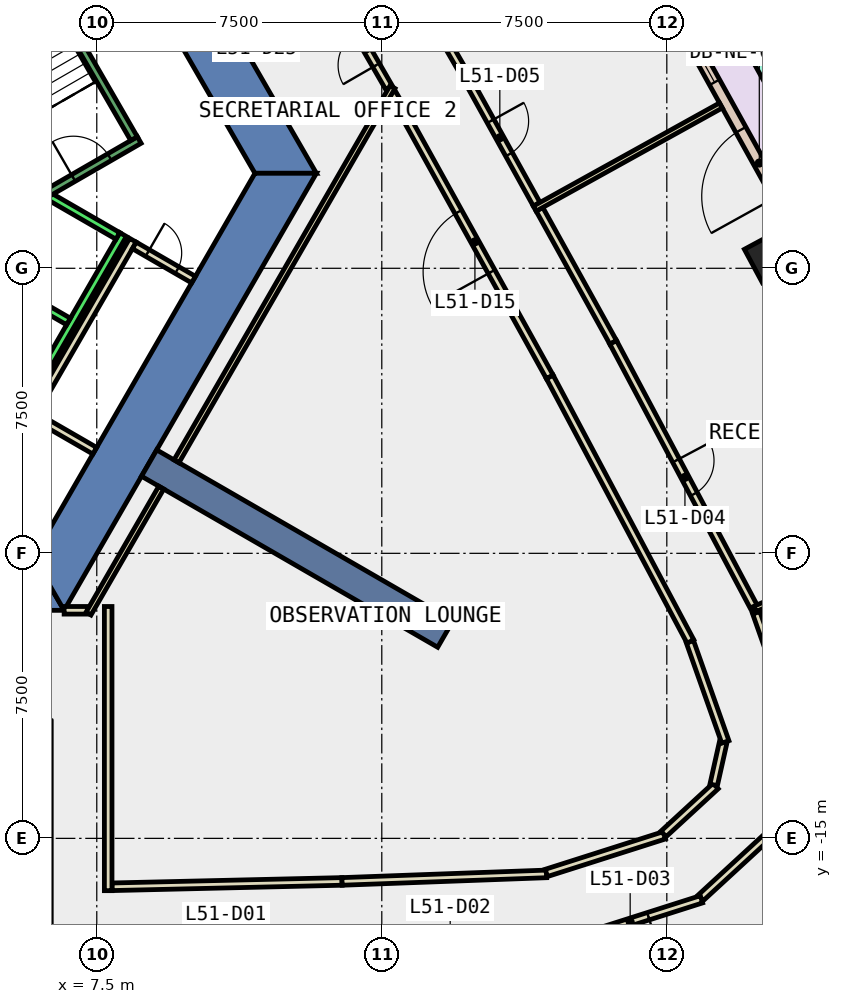
"""IFC4 building model, lengths in metres.
Left out: names, types, materials, properties, quantities, classifications, styles, units other than length and angle.
Written with IfcOpenShell. Run it as: python <this file> out.ifc"""

import sys

from ifc_helpers import new_model, si_unit, direction, frame, frame_2d, origin, origin_2d, place, context, subcontext, project, spatial, polyline, rectangle, outline, extrude, element, fill, save


model = new_model("IFC4")
c1 = context("Model", 3, precision=1e-05, world=origin(), true_north=direction((0.0, 1.0)))
c2 = subcontext(c1, "Body", "Model", "MODEL_VIEW")
j1 = project(units=[si_unit("LENGTHUNIT", "METRE"), si_unit("PLANEANGLEUNIT", "RADIAN")], contexts=[c1])
p1 = place(None, origin())
s1 = spatial("IfcSite", under=j1, at=p1, CompositionType="ELEMENT")
p2 = place(p1, origin())
s2 = spatial("IfcBuilding", under=s1, at=p2, CompositionType="ELEMENT")
p3 = place(p2, frame((0.0, 0.0, 227.6)))
s3 = spatial("IfcBuildingStorey", under=s2, at=p3, CompositionType="ELEMENT", Elevation=227.6)
p4 = place(p3, frame((25.395, 0.391, -0.4), z_axis=(0.0, 0.0, 1.0), x_axis=(-0.474134310084, 0.880452529102, 0.0)))
e1 = element("IfcColumn", 1, at=p4, inside=s3, PredefinedType="COLUMN", context=c2, shape_type="SweptSolid", body=[
    extrude(rectangle(XDim=1.0, YDim=1.4, at=origin_2d()), origin(), (0.0, 0.0, 1.0), 4.2),
])
p5 = place(p3, frame((0.0, 0.0, -0.4)))
e2 = element("IfcWall", 2, at=p5, inside=s3, PredefinedType="SHEAR", context=c2, shape_type="SweptSolid", body=[
    extrude(outline(polyline([(8.084, 11.498), (6.871, 10.798), (11.662, 2.5), (13.279, 2.5), (8.084, 11.498)])), origin(), (0.0, 0.0, 1.0), 4.2),
])
p6 = place(p3, frame((0.0, 0.0, -0.4)))
e3 = element("IfcWall", 3, at=p6, inside=s3, PredefinedType="SHEAR", context=c2, shape_type="SweptSolid", body=[
    extrude(outline(polyline([(5.75, -7.6), (5.75, -9.0), (6.64, -9.0), (5.831, -7.6), (5.75, -7.6)])), origin(), (0.0, 0.0, 1.0), 4.2),
])
p7 = place(p3, frame((0.0, 0.0, -0.4)))
e4 = element("IfcWall", 4, at=p7, inside=s3, PredefinedType="SHEAR", context=c2, shape_type="SweptSolid", body=[
    extrude(outline(polyline([(6.64, -9.0), (13.279, 2.5), (11.662, 2.5), (5.831, -7.6), (6.64, -9.0)])), origin(), (0.0, 0.0, 1.0), 4.2),
])
p8 = place(p3, frame((8.877, -5.125, -0.4), z_axis=(0.0, 0.0, 1.0), x_axis=(0.866017533419, -0.500013631625, 0.0)))
e5 = element("IfcWall", 5, at=p8, inside=s3, PredefinedType="SHEAR", context=c2, shape_type="SweptSolid", body=[
    extrude(rectangle(XDim=9.0, YDim=0.8, at=frame_2d((4.5, 0.0))), origin(), (0.0, 0.0, 1.0), 4.2),
])
p9 = place(p3, frame((25.813, 1.183, 0.0), z_axis=(0.0, 0.0, 1.0), x_axis=(-0.484742980126, 0.874656643043, 0.0)))
e6 = element("IfcWall", 6, at=p9, inside=s3, PredefinedType="STANDARD", context=c2, shape_type="SweptSolid", body=[
    extrude(rectangle(XDim=7.258, YDim=0.3, at=frame_2d((3.629, 0.0))), origin(), (0.0, 0.0, 1.0), 3.8),
])
p10 = place(p9, frame((0.814, 0.0, 0.0)))
e7 = element("IfcOpeningElement", 7, at=p10, cuts=e6, PredefinedType="OPENING", context=c2, shape_type="SweptSolid", body=[
    extrude(rectangle(XDim=2.0, YDim=2.4, at=frame_2d((1.0, 1.2))), frame((0.0, 0.16, 0.0), z_axis=(0.0, -1.0, 0.0), x_axis=(1.0, 0.0, 0.0)), (0.0, 0.0, 1.0), 0.32),
])
p11 = place(p9, frame((4.243, 0.0, 0.9)))
e8 = element("IfcOpeningElement", 8, at=p11, cuts=e6, PredefinedType="OPENING", context=c2, shape_type="SweptSolid", body=[
    extrude(rectangle(XDim=2.4, YDim=2.6, at=frame_2d((1.2, 1.3))), frame((0.0, 0.16, 0.0), z_axis=(0.0, -1.0, 0.0), x_axis=(1.0, 0.0, 0.0)), (0.0, 0.0, 1.0), 0.32),
])
p12 = place(p3, frame((27.121, 2.021, 0.0), z_axis=(0.0, 0.0, 1.0), x_axis=(-0.484785237665, 0.874633222181, 0.0)))
e9 = element("IfcWall", 9, at=p12, inside=s3, PredefinedType="STANDARD", context=c2, shape_type="SweptSolid", body=[
    extrude(rectangle(XDim=7.059, YDim=0.8, at=frame_2d((3.53, 0.0))), origin(), (0.0, 0.0, 1.0), 0.8),
])
p13 = place(p3, frame((15.194, 4.747, 0.0), z_axis=(0.0, 0.0, 1.0), x_axis=(-0.500140598757, 0.865944213836, 0.0)))
e10 = element("IfcWall", 10, at=p13, inside=s3, PredefinedType="PARTITIONING", context=c2, shape_type="SweptSolid", body=[
    extrude(rectangle(XDim=2.375, YDim=0.2, at=frame_2d((1.188, 0.0))), origin(), (0.0, 0.0, 1.0), 3.8),
])
p14 = place(p13, frame((0.688, 0.0, 0.0)))
e11 = element("IfcOpeningElement", 11, at=p14, cuts=e10, PredefinedType="OPENING", context=c2, shape_type="SweptSolid", body=[
    extrude(rectangle(XDim=1.0, YDim=2.1, at=frame_2d((0.5, 1.05))), frame((0.0, 0.11, 0.0), z_axis=(0.0, -1.0, 0.0), x_axis=(1.0, 0.0, 0.0)), (0.0, 0.0, 1.0), 0.22),
])
p15 = place(p3, frame((7.9, -16.274, 0.0), z_axis=(0.0, 0.0, 1.0), x_axis=(0.999729409829, 0.023261709391, 0.0)))
e12 = element("IfcWall", 12, at=p15, inside=s3, PredefinedType="PARTITIONING", context=c2, shape_type="SweptSolid", body=[
    extrude(rectangle(XDim=6.056, YDim=0.2, at=frame_2d((3.028, 0.0))), origin(), (0.0, 0.0, 1.0), 3.8),
])
p16 = place(p3, frame((13.954, -16.133, 0.0), z_axis=(0.0, 0.0, 1.0), x_axis=(0.999323686931, 0.036771847101, 0.0)))
e13 = element("IfcWall", 13, at=p16, inside=s3, PredefinedType="PARTITIONING", context=c2, shape_type="SweptSolid", body=[
    extrude(rectangle(XDim=5.385, YDim=0.2, at=frame_2d((2.692, 0.0))), origin(), (0.0, 0.0, 1.0), 3.8),
])
p17 = place(p3, frame((19.33, -15.909, 0.0), z_axis=(0.0, 0.0, 1.0), x_axis=(0.952831275662, 0.303500510906, 0.0)))
e14 = element("IfcWall", 14, at=p17, inside=s3, PredefinedType="PARTITIONING", context=c2, shape_type="SweptSolid", body=[
    extrude(rectangle(XDim=3.259, YDim=0.2, at=frame_2d((1.629, 0.0))), origin(), (0.0, 0.0, 1.0), 3.8),
])
p18 = place(p3, frame((22.414, -14.883, 0.0), z_axis=(0.0, 0.0, 1.0), x_axis=(0.735983257634, 0.676999737432, 0.0)))
e15 = element("IfcWall", 15, at=p18, inside=s3, PredefinedType="PARTITIONING", context=c2, shape_type="SweptSolid", body=[
    extrude(rectangle(XDim=1.863, YDim=0.2, at=frame_2d((0.931, 0.0))), origin(), (0.0, 0.0, 1.0), 3.8),
])
p19 = place(p3, frame((23.733, -13.592, 0.0), z_axis=(0.0, 0.0, 1.0), x_axis=(0.218746220366, 0.975781784558, 0.0)))
e16 = element("IfcWall", 16, at=p19, inside=s3, PredefinedType="PARTITIONING", context=c2, shape_type="SweptSolid", body=[
    extrude(rectangle(XDim=1.153, YDim=0.2, at=frame_2d((0.576, 0.0))), origin(), (0.0, 0.0, 1.0), 3.8),
])
p20 = place(p3, frame((24.04, -12.463, 0.0), z_axis=(0.0, 0.0, 1.0), x_axis=(-0.333166995935, 0.942867834227, 0.0)))
e17 = element("IfcWall", 17, at=p20, inside=s3, PredefinedType="PARTITIONING", context=c2, shape_type="SweptSolid", body=[
    extrude(rectangle(XDim=2.798, YDim=0.2, at=frame_2d((1.399, 0.0))), origin(), (0.0, 0.0, 1.0), 3.8),
])
p21 = place(p3, frame((23.121, -9.819, 0.0), z_axis=(0.0, 0.0, 1.0), x_axis=(-0.469450210487, 0.882958945746, 0.0)))
e18 = element("IfcWall", 18, at=p21, inside=s3, PredefinedType="PARTITIONING", context=c2, shape_type="SweptSolid", body=[
    extrude(rectangle(XDim=7.886, YDim=0.2, at=frame_2d((3.943, 0.0))), origin(), (0.0, 0.0, 1.0), 3.8),
])
p22 = place(p3, frame((19.419, -2.856, 0.0), z_axis=(0.0, 0.0, 1.0), x_axis=(-0.484683114876, 0.874689818252, 0.0)))
e19 = element("IfcWall", 19, at=p22, inside=s3, PredefinedType="PARTITIONING", context=c2, shape_type="SweptSolid", body=[
    extrude(rectangle(XDim=8.123, YDim=0.2, at=frame_2d((4.062, 0.0))), origin(), (0.0, 0.0, 1.0), 3.8),
])
p23 = place(p22, frame((3.161, 0.0, 0.0)))
e20 = element("IfcOpeningElement", 20, at=p23, cuts=e19, PredefinedType="OPENING", context=c2, shape_type="SweptSolid", body=[
    extrude(rectangle(XDim=1.8, YDim=2.1, at=frame_2d((0.9, 1.05))), frame((0.0, 0.11, 0.0), z_axis=(0.0, -1.0, 0.0), x_axis=(1.0, 0.0, 0.0)), (0.0, 0.0, 1.0), 0.22),
])
p24 = place(p3, frame((15.482, 4.249, 0.0), z_axis=(0.0, 0.0, 1.0), x_axis=(-0.500832493767, 0.865544229481, 0.0)))
e21 = element("IfcWall", 21, at=p24, inside=s3, PredefinedType="PARTITIONING", context=c2, shape_type="SweptSolid", body=[
    extrude(rectangle(XDim=0.425, YDim=0.2, at=frame_2d((0.212, 0.0))), origin(), (0.0, 0.0, 1.0), 3.8),
])
p25 = place(p3, frame((24.852, -9.059, 0.0), z_axis=(0.0, 0.0, 1.0), x_axis=(0.333116923704, -0.942885526001, 0.0)))
e22 = element("IfcWall", 22, at=p25, inside=s3, PredefinedType="PARTITIONING", context=c2, shape_type="SweptSolid", body=[
    extrude(rectangle(XDim=3.485, YDim=0.2, at=frame_2d((1.742, 0.0))), origin(), (0.0, 0.0, 1.0), 3.8),
])
p26 = place(p3, frame((25.509, -14.617, 0.0), z_axis=(0.0, 0.0, 1.0), x_axis=(-0.735846476242, -0.677148405745, 0.0)))
e23 = element("IfcWall", 23, at=p26, inside=s3, PredefinedType="PARTITIONING", context=c2, shape_type="SweptSolid", body=[
    extrude(rectangle(XDim=2.878, YDim=0.2, at=frame_2d((1.439, 0.0))), origin(), (0.0, 0.0, 1.0), 3.8),
])
p27 = place(p3, frame((23.412, -16.603, 0.0), z_axis=(0.0, 0.0, 1.0), x_axis=(-0.952838618572, -0.303477457083, 0.0)))
e24 = element("IfcWall", 24, at=p27, inside=s3, PredefinedType="PARTITIONING", context=c2, shape_type="SweptSolid", body=[
    extrude(rectangle(XDim=3.938, YDim=0.2, at=frame_2d((1.969, 0.0))), origin(), (0.0, 0.0, 1.0), 3.8),
])
p28 = place(p27, frame((1.469, 0.0, 0.0)))
e25 = element("IfcOpeningElement", 25, at=p28, cuts=e24, PredefinedType="OPENING", context=c2, shape_type="SweptSolid", body=[
    extrude(rectangle(XDim=1.0, YDim=2.1, at=frame_2d((0.5, 1.05))), frame((0.0, 0.11, 0.0), z_axis=(0.0, -1.0, 0.0), x_axis=(1.0, 0.0, 0.0)), (0.0, 0.0, 1.0), 0.22),
])
p29 = place(p3, frame((19.149, 1.553, 0.0), z_axis=(0.0, 0.0, 1.0), x_axis=(0.484622593188, -0.874723351793, 0.0)))
e26 = element("IfcWall", 26, at=p29, inside=s3, PredefinedType="PARTITIONING", context=c2, shape_type="SweptSolid", body=[
    extrude(rectangle(XDim=4.003, YDim=0.2, at=frame_2d((2.002, 0.0))), origin(), (0.0, 0.0, 1.0), 3.8),
])
p30 = place(p3, frame((21.089, -1.949, 0.0), z_axis=(0.0, 0.0, 1.0), x_axis=(0.469431794586, -0.882968736837, 0.0)))
e27 = element("IfcWall", 27, at=p30, inside=s3, PredefinedType="PARTITIONING", context=c2, shape_type="SweptSolid", body=[
    extrude(rectangle(XDim=8.046, YDim=0.2, at=frame_2d((4.023, 0.0))), origin(), (0.0, 0.0, 1.0), 3.8),
])
p31 = place(p30, frame((3.522, 0.0, 0.0)))
e28 = element("IfcOpeningElement", 28, at=p31, cuts=e27, PredefinedType="OPENING", context=c2, shape_type="SweptSolid", body=[
    extrude(rectangle(XDim=1.0, YDim=2.1, at=frame_2d((0.5, 1.05))), frame((0.0, 0.11, 0.0), z_axis=(0.0, -1.0, 0.0), x_axis=(1.0, 0.0, 0.0)), (0.0, 0.0, 1.0), 0.22),
])
p32 = place(p3, frame((15.135, 8.65, 0.0), z_axis=(0.0, 0.0, 1.0), x_axis=(0.500102734445, -0.865966081899, 0.0)))
e29 = element("IfcWall", 29, at=p32, inside=s3, PredefinedType="PARTITIONING", context=c2, shape_type="SweptSolid", body=[
    extrude(rectangle(XDim=4.001, YDim=0.2, at=frame_2d((2.0, 0.0))), origin(), (0.0, 0.0, 1.0), 3.8),
])
p33 = place(p3, frame((17.136, 5.185, 0.0), z_axis=(0.0, 0.0, 1.0), x_axis=(0.484679349661, -0.874691904623, 0.0)))
e30 = element("IfcWall", 30, at=p33, inside=s3, PredefinedType="PARTITIONING", context=c2, shape_type="SweptSolid", body=[
    extrude(rectangle(XDim=4.002, YDim=0.2, at=frame_2d((2.001, 0.0))), origin(), (0.0, 0.0, 1.0), 3.8),
])
p34 = place(p33, frame((1.501, 0.0, 0.0)))
e31 = element("IfcOpeningElement", 31, at=p34, cuts=e30, PredefinedType="OPENING", context=c2, shape_type="SweptSolid", body=[
    extrude(rectangle(XDim=1.0, YDim=2.1, at=frame_2d((0.5, 1.05))), frame((0.0, 0.11, 0.0), z_axis=(0.0, -1.0, 0.0), x_axis=(1.0, 0.0, 0.0)), (0.0, 0.0, 1.0), 0.22),
])
p35 = place(p3, frame((5.751, -3.938, 0.0), z_axis=(0.0, 0.0, 1.0), x_axis=(0.500034260056, 0.866005622828, 0.0)))
e32 = element("IfcWall", 32, at=p35, inside=s3, PredefinedType="PARTITIONING", context=c2, shape_type="SweptSolid", body=[
    extrude(rectangle(XDim=5.399, YDim=0.2, at=frame_2d((2.7, 0.0))), origin(), (0.0, 0.0, 1.0), 3.8),
])
p36 = place(p3, frame((8.488, 0.602, 0.0), z_axis=(0.0, 0.0, 1.0), x_axis=(0.86585331735, -0.500297944063, 0.0)))
e33 = element("IfcWall", 33, at=p36, inside=s3, PredefinedType="PARTITIONING", context=c2, shape_type="SweptSolid", body=[
    extrude(rectangle(XDim=1.799, YDim=0.2, at=frame_2d((0.9, 0.0))), origin(), (0.0, 0.0, 1.0), 3.8),
])
p37 = place(p36, frame((0.4, 0.0, 0.0)))
e34 = element("IfcOpeningElement", 34, at=p37, cuts=e33, PredefinedType="OPENING", context=c2, shape_type="SweptSolid", body=[
    extrude(rectangle(XDim=0.9, YDim=2.1, at=frame_2d((0.45, 1.05))), frame((0.0, 0.11, 0.0), z_axis=(0.0, -1.0, 0.0), x_axis=(1.0, 0.0, 0.0)), (0.0, 0.0, 1.0), 0.22),
])
p38 = place(p3, frame((7.447, -4.801, 0.0), z_axis=(0.0, 0.0, 1.0), x_axis=(-0.866316547501, 0.499495384889, 0.0)))
e35 = element("IfcWall", 35, at=p38, inside=s3, PredefinedType="PARTITIONING", context=c2, shape_type="SweptSolid", body=[
    extrude(rectangle(XDim=1.8, YDim=0.2, at=frame_2d((0.9, 0.0))), origin(), (0.0, 0.0, 1.0), 3.8),
])
p39 = place(p3, frame((6.641, -8.999, 0.0), z_axis=(0.0, 0.0, 1.0), x_axis=(1.0, 0.0, 0.0)))
e36 = element("IfcWall", 36, at=p39, inside=s3, PredefinedType="PARTITIONING", context=c2, shape_type="SweptSolid", body=[
    extrude(rectangle(XDim=0.617, YDim=0.2, at=frame_2d((0.309, 0.0))), origin(), (0.0, 0.0, 1.0), 3.8),
])
p40 = place(p3, frame((7.283, -9.086, 0.0), z_axis=(0.0, 0.0, 1.0), x_axis=(0.500035303972, 0.866005020067, 0.0)))
e37 = element("IfcWall", 37, at=p40, inside=s3, PredefinedType="PARTITIONING", context=c2, shape_type="SweptSolid", body=[
    extrude(rectangle(XDim=3.828, YDim=0.15, at=frame_2d((1.914, 0.0))), origin(), (0.0, 0.0, 1.0), 3.8),
])
p41 = place(p3, frame((7.8, -8.899, 0.0), z_axis=(0.0, 0.0, 1.0), x_axis=(0.0, -1.0, 0.0)))
e38 = element("IfcWall", 38, at=p41, inside=s3, PredefinedType="PARTITIONING", context=c2, shape_type="SweptSolid", body=[
    extrude(rectangle(XDim=7.477, YDim=0.2, at=frame_2d((3.739, 0.0))), origin(), (0.0, 0.0, 1.0), 3.8),
])
p42 = place(p3, frame((24.819, -8.964, 0.0), z_axis=(0.0, 0.0, 1.0), x_axis=(0.915460951187, 0.402406817602, 0.0)))
e39 = element("IfcWall", 39, at=p42, inside=s3, PredefinedType="PARTITIONING", context=c2, shape_type="SweptSolid", body=[
    extrude(rectangle(XDim=4.192, YDim=0.15, at=frame_2d((2.096, 0.0))), origin(), (0.0, 0.0, 1.0), 3.8),
])
p43 = place(p3, frame((19.025, 1.57, 0.0), z_axis=(0.0, 0.0, 1.0), x_axis=(0.874714019242, 0.484639437666, 0.0)))
e40 = element("IfcWall", 40, at=p43, inside=s3, PredefinedType="PARTITIONING", context=c2, shape_type="SweptSolid", body=[
    extrude(rectangle(XDim=5.6, YDim=0.15, at=frame_2d((2.8, 0.0))), origin(), (0.0, 0.0, 1.0), 3.8),
])
p44 = place(p3, frame((9.597, -5.079, 0.0), z_axis=(0.0, 0.0, 1.0), x_axis=(0.499949193323, 0.866054735046, 0.0)))
e41 = element("IfcWall", 41, at=p44, inside=s3, PredefinedType="PARTITIONING", context=c2, shape_type="SweptSolid", body=[
    extrude(rectangle(XDim=11.371, YDim=0.15, at=frame_2d((5.686, 0.0))), origin(), (0.0, 0.0, 1.0), 3.8),
])
p45 = place(p3, frame((5.492, -3.788, 0.0), z_axis=(0.0, 0.0, 1.0), x_axis=(0.500034260056, 0.866005622828, 0.0)))
e42 = element("IfcWall", 42, at=p45, inside=s3, PredefinedType="STANDARD", context=c2, shape_type="SweptSolid", body=[
    extrude(rectangle(XDim=5.399, YDim=0.2, at=frame_2d((2.7, 0.0))), origin(), (0.0, 0.0, 1.0), 3.8),
])
for number, where, z_axis, x_axis in (
    (43, (4.677, -0.2, 0.0), (0.0, 0.0, 1.0), (0.866, -0.5, 0.0)),
    (44, (5.977, 2.052, 0.0), (0.0, 0.0, 1.0), (0.866, -0.5, 0.0)),
):
    element("IfcWall", number, at=place(p3, frame(where, z_axis=z_axis, x_axis=x_axis)), inside=s3, PredefinedType="STANDARD", context=c2, shape_type="SweptSolid", body=[
        extrude(rectangle(XDim=2.399, YDim=0.2, at=frame_2d((1.2, 0.0))), origin(), (0.0, 0.0, 1.0), 3.8),
    ])
p46 = place(p3, frame((4.806, 1.176, 0.0), z_axis=(0.0, 0.0, 1.0), x_axis=(0.866059941101, 0.499940174841, 0.0)))
e45 = element("IfcWall", 45, at=p46, inside=s3, PredefinedType="STANDARD", context=c2, shape_type="SweptSolid", body=[
    extrude(rectangle(XDim=4.4, YDim=0.2, at=frame_2d((2.2, 0.0))), origin(), (0.0, 0.0, 1.0), 3.8),
])
p47 = place(p46, frame((2.4, 0.0, 0.0)))
e46 = element("IfcOpeningElement", 46, at=p47, cuts=e45, PredefinedType="OPENING", context=c2, shape_type="SweptSolid", body=[
    extrude(rectangle(XDim=1.1, YDim=2.2, at=frame_2d((0.55, 1.1))), frame((0.0, 0.11, 0.0), z_axis=(0.0, -1.0, 0.0), x_axis=(1.0, 0.0, 0.0)), (0.0, 0.0, 1.0), 0.22),
])
p48 = place(p3, frame((8.48, 3.412, 0.0), z_axis=(0.0, 0.0, 1.0), x_axis=(-0.499978703459, 0.866037698999, 0.0)))
e47 = element("IfcWall", 47, at=p48, inside=s3, PredefinedType="STANDARD", context=c2, shape_type="SweptSolid", body=[
    extrude(rectangle(XDim=6.9, YDim=0.2, at=frame_2d((3.45, 0.0))), origin(), (0.0, 0.0, 1.0), 3.8),
])
p49 = place(p10, origin())
e48 = element("IfcDoor", 48, at=p49, inside=s3, OperationType="SLIDING_TO_LEFT", PredefinedType="DOOR", context=c2, shape_type="SweptSolid", body=[
    extrude(rectangle(XDim=2.0, YDim=2.4, at=frame_2d((1.0, 1.2))), frame((0.0, 0.025, 0.0), z_axis=(0.0, -1.0, 0.0), x_axis=(1.0, 0.0, 0.0)), (0.0, 0.0, 1.0), 0.05),
])
fill(e7, e48)
p50 = place(p11, origin())
e49 = element("IfcWindow", 49, at=p50, inside=s3, PartitioningType="SINGLE_PANEL", PredefinedType="WINDOW", context=c2, shape_type="SweptSolid", body=[
    extrude(rectangle(XDim=2.4, YDim=2.6, at=frame_2d((1.2, 1.3))), frame((0.0, 0.03, 0.0), z_axis=(0.0, -1.0, 0.0), x_axis=(1.0, 0.0, 0.0)), (0.0, 0.0, 1.0), 0.06),
])
fill(e8, e49)
p51 = place(p28, origin())
e50 = element("IfcDoor", 50, at=p51, inside=s3, OperationType="SINGLE_SWING_LEFT", PredefinedType="DOOR", context=c2, shape_type="SweptSolid", body=[
    extrude(rectangle(XDim=1.0, YDim=2.1, at=frame_2d((0.5, 1.05))), frame((0.0, 0.025, 0.0), z_axis=(0.0, -1.0, 0.0), x_axis=(1.0, 0.0, 0.0)), (0.0, 0.0, 1.0), 0.05),
])
fill(e25, e50)
p52 = place(p31, origin())
e51 = element("IfcDoor", 51, at=p52, inside=s3, OperationType="SINGLE_SWING_LEFT", PredefinedType="DOOR", context=c2, shape_type="SweptSolid", body=[
    extrude(rectangle(XDim=1.0, YDim=2.1, at=frame_2d((0.5, 1.05))), frame((0.0, 0.025, 0.0), z_axis=(0.0, -1.0, 0.0), x_axis=(1.0, 0.0, 0.0)), (0.0, 0.0, 1.0), 0.05),
])
fill(e28, e51)
p53 = place(p34, origin())
e52 = element("IfcDoor", 52, at=p53, inside=s3, OperationType="SINGLE_SWING_LEFT", PredefinedType="DOOR", context=c2, shape_type="SweptSolid", body=[
    extrude(rectangle(XDim=1.0, YDim=2.1, at=frame_2d((0.5, 1.05))), frame((0.0, 0.025, 0.0), z_axis=(0.0, -1.0, 0.0), x_axis=(1.0, 0.0, 0.0)), (0.0, 0.0, 1.0), 0.05),
])
fill(e31, e52)
p54 = place(p23, origin())
e53 = element("IfcDoor", 53, at=p54, inside=s3, OperationType="DOUBLE_DOOR_SINGLE_SWING", PredefinedType="DOOR", context=c2, shape_type="SweptSolid", body=[
    extrude(rectangle(XDim=1.8, YDim=2.1, at=frame_2d((0.9, 1.05))), frame((0.0, 0.025, 0.0), z_axis=(0.0, -1.0, 0.0), x_axis=(1.0, 0.0, 0.0)), (0.0, 0.0, 1.0), 0.05),
])
fill(e20, e53)
p55 = place(p14, origin())
e54 = element("IfcDoor", 54, at=p55, inside=s3, OperationType="SINGLE_SWING_LEFT", PredefinedType="DOOR", context=c2, shape_type="SweptSolid", body=[
    extrude(rectangle(XDim=1.0, YDim=2.1, at=frame_2d((0.5, 1.05))), frame((0.0, 0.025, 0.0), z_axis=(0.0, -1.0, 0.0), x_axis=(1.0, 0.0, 0.0)), (0.0, 0.0, 1.0), 0.05),
])
fill(e11, e54)
p56 = place(p37, origin())
e55 = element("IfcDoor", 55, at=p56, inside=s3, OperationType="SINGLE_SWING_RIGHT", PredefinedType="DOOR", context=c2, shape_type="SweptSolid", body=[
    extrude(rectangle(XDim=0.9, YDim=2.1, at=frame_2d((0.45, 1.05))), frame((0.0, 0.025, 0.0), z_axis=(0.0, -1.0, 0.0), x_axis=(1.0, 0.0, 0.0)), (0.0, 0.0, 1.0), 0.05),
])
fill(e34, e55)
p57 = place(p47, origin())
e56 = element("IfcDoor", 56, at=p57, inside=s3, OperationType="SINGLE_SWING_LEFT", PredefinedType="DOOR", context=c2, shape_type="SweptSolid", body=[
    extrude(rectangle(XDim=1.1, YDim=2.2, at=frame_2d((0.55, 1.1))), frame((0.0, 0.025, 0.0), z_axis=(0.0, -1.0, 0.0), x_axis=(1.0, 0.0, 0.0)), (0.0, 0.0, 1.0), 0.05),
])
fill(e46, e56)
save(model, sys.argv[1])
